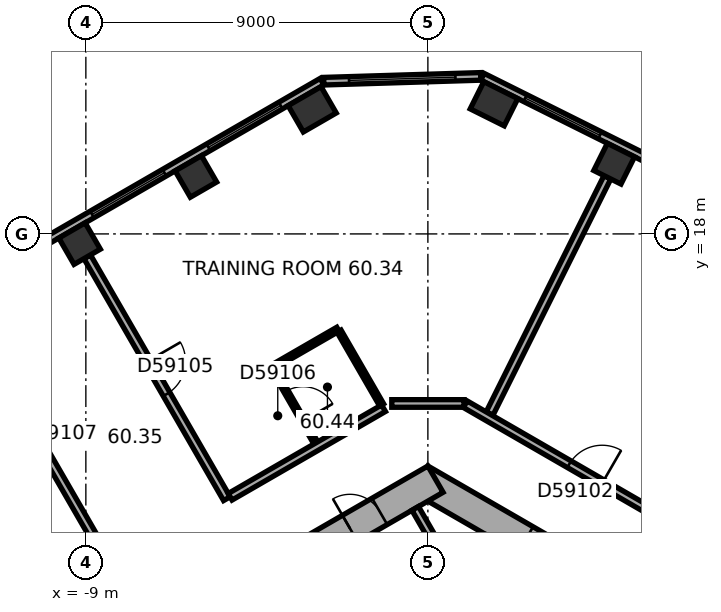
"""IFC4 building model, lengths in metres.
Left out: names, types, materials, properties, quantities, classifications, styles, units other than length and angle.
Written with IfcOpenShell. Run it as: python <this file> out.ifc"""

import sys

from ifc_helpers import new_model, si_unit, direction, frame, frame_2d, origin, origin_2d, place, context, subcontext, project, spatial, rectangle, extrude, element, fill, save


model = new_model("IFC4")
c1 = context("Model", 3, precision=1e-05, world=origin(), true_north=direction((0.0, 1.0)))
c2 = subcontext(c1, "Body", "Model", "MODEL_VIEW")
j1 = project(units=[si_unit("LENGTHUNIT", "METRE"), si_unit("PLANEANGLEUNIT", "RADIAN")], contexts=[c1])
p1 = place(None, origin())
s1 = spatial("IfcSite", under=j1, at=p1, CompositionType="ELEMENT")
p2 = place(p1, origin())
s2 = spatial("IfcBuilding", under=s1, at=p2, CompositionType="ELEMENT")
p3 = place(p2, frame((0.0, 0.0, 243.9)))
s3 = spatial("IfcBuildingStorey", under=s2, at=p3, CompositionType="ELEMENT", Elevation=243.9)
p4 = place(p3, frame((4.902, 19.848, 0.0), z_axis=(0.0, 0.0, 1.0), x_axis=(-0.894934361602, 0.44619781311, 0.0)))
e1 = element("IfcColumn", 1, at=p4, inside=s3, PredefinedType="COLUMN", context=c2, shape_type="SweptSolid", body=[
    extrude(rectangle(XDim=0.8, YDim=0.8, at=origin_2d()), origin(), (0.0, 0.0, 1.0), 3.7),
])
for number, where, z_axis, x_axis in (
    (2, (1.74, 21.425, 0.0), (0.0, 0.0, 1.0), (-0.895, 0.446, 0.0)),
    (3, (-3.044, 21.279, 0.0), (0.0, 0.0, 1.0), (-0.866, -0.5, 0.0)),
):
    element("IfcColumn", number, at=place(p3, frame(where, z_axis=z_axis, x_axis=x_axis)), inside=s3, PredefinedType="COLUMN", context=c2, shape_type="SweptSolid", body=[
        extrude(rectangle(XDim=1.0, YDim=0.8, at=origin_2d()), origin(), (0.0, 0.0, 1.0), 3.7),
    ])
for number, where, z_axis, x_axis in (
    (4, (-6.104, 19.512, 0.0), (0.0, 0.0, 1.0), (-0.866, -0.5, 0.0)),
    (5, (-9.165, 17.745, 0.0), (0.0, 0.0, 1.0), (-0.866, -0.5, 0.0)),
):
    element("IfcColumn", number, at=place(p3, frame(where, z_axis=z_axis, x_axis=x_axis)), inside=s3, PredefinedType="COLUMN", context=c2, shape_type="SweptSolid", body=[
        extrude(rectangle(XDim=0.8, YDim=0.8, at=origin_2d()), origin(), (0.0, 0.0, 1.0), 3.7),
    ])
p5 = place(p3, frame((10.1, 5.6, 0.0), z_axis=(0.0, 0.0, 1.0), x_axis=(-0.866023897231, 0.500002609418, 0.0)))
e6 = element("IfcWall", 6, at=p5, inside=s3, PredefinedType="SHEAR", context=c2, shape_type="SweptSolid", body=[
    extrude(rectangle(XDim=11.894, YDim=0.8, at=frame_2d((5.947, 0.0))), origin(), (0.0, 0.0, 1.0), 3.7),
])
p6 = place(p5, frame((3.897, 0.0, 0.0)))
e7 = element("IfcOpeningElement", 7, at=p6, cuts=e6, PredefinedType="OPENING", context=c2, shape_type="SweptSolid", body=[
    extrude(rectangle(XDim=0.9, YDim=2.1, at=frame_2d((0.45, 1.05))), frame((0.0, 0.41, 0.0), z_axis=(0.0, -1.0, 0.0), x_axis=(1.0, 0.0, 0.0)), (0.0, 0.0, 1.0), 0.82),
])
p7 = place(p5, frame((7.797, 0.0, 0.0)))
e8 = element("IfcOpeningElement", 8, at=p7, cuts=e6, PredefinedType="OPENING", context=c2, shape_type="SweptSolid", body=[
    extrude(rectangle(XDim=0.9, YDim=2.1, at=frame_2d((0.45, 1.05))), frame((0.0, 0.41, 0.0), z_axis=(0.0, -1.0, 0.0), x_axis=(1.0, 0.0, 0.0)), (0.0, 0.0, 1.0), 0.82),
])
p8 = place(p3, frame((0.2, 11.547, 0.0), z_axis=(0.0, 0.0, 1.0), x_axis=(-0.866023897231, -0.500002609418, 0.0)))
e9 = element("IfcWall", 9, at=p8, inside=s3, PredefinedType="SHEAR", context=c2, shape_type="SweptSolid", body=[
    extrude(rectangle(XDim=11.894, YDim=0.8, at=frame_2d((5.947, 0.0))), origin(), (0.0, 0.0, 1.0), 3.7),
])
p9 = place(p8, frame((6.147, 0.0, 0.0)))
e10 = element("IfcOpeningElement", 10, at=p9, cuts=e9, PredefinedType="OPENING", context=c2, shape_type="SweptSolid", body=[
    extrude(rectangle(XDim=1.5, YDim=2.1, at=frame_2d((0.75, 1.05))), frame((0.0, 0.41, 0.0), z_axis=(0.0, -1.0, 0.0), x_axis=(1.0, 0.0, 0.0)), (0.0, 0.0, 1.0), 0.82),
])
p10 = place(p8, frame((1.697, 0.0, 0.0)))
e11 = element("IfcOpeningElement", 11, at=p10, cuts=e9, PredefinedType="OPENING", context=c2, shape_type="SweptSolid", body=[
    extrude(rectangle(XDim=0.9, YDim=2.1, at=frame_2d((0.45, 1.05))), frame((0.0, 0.41, 0.0), z_axis=(0.0, -1.0, 0.0), x_axis=(1.0, 0.0, 0.0)), (0.0, 0.0, 1.0), 0.82),
])
p11 = place(p8, frame((4.297, 0.0, 0.0)))
e12 = element("IfcOpeningElement", 12, at=p11, cuts=e9, PredefinedType="OPENING", context=c2, shape_type="SweptSolid", body=[
    extrude(rectangle(XDim=0.9, YDim=2.1, at=frame_2d((0.45, 1.05))), frame((0.0, 0.41, 0.0), z_axis=(0.0, -1.0, 0.0), x_axis=(1.0, 0.0, 0.0)), (0.0, 0.0, 1.0), 0.82),
])
p12 = place(p3, frame((18.299, 13.727, 0.0), z_axis=(0.0, 0.0, 1.0), x_axis=(-0.894934554817, 0.44619742558, 0.0)))
e13 = element("IfcWall", 13, at=p12, inside=s3, PredefinedType="STANDARD", context=c2, shape_type="SweptSolid", body=[
    extrude(rectangle(XDim=18.841, YDim=0.2, at=frame_2d((9.421, 0.0))), origin(), (0.0, 0.0, 1.0), 3.7),
])
p13 = place(p12, frame((1.253, 0.0, 0.9)))
e14 = element("IfcOpeningElement", 14, at=p13, cuts=e13, PredefinedType="OPENING", context=c2, shape_type="SweptSolid", body=[
    extrude(rectangle(XDim=2.2, YDim=2.0, at=frame_2d((1.1, 1.0))), frame((0.0, 0.11, 0.0), z_axis=(0.0, -1.0, 0.0), x_axis=(1.0, 0.0, 0.0)), (0.0, 0.0, 1.0), 0.22),
])
p14 = place(p12, frame((4.786, 0.0, 0.9)))
e15 = element("IfcOpeningElement", 15, at=p14, cuts=e13, PredefinedType="OPENING", context=c2, shape_type="SweptSolid", body=[
    extrude(rectangle(XDim=2.2, YDim=2.0, at=frame_2d((1.1, 1.0))), frame((0.0, 0.11, 0.0), z_axis=(0.0, -1.0, 0.0), x_axis=(1.0, 0.0, 0.0)), (0.0, 0.0, 1.0), 0.22),
])
p15 = place(p12, frame((8.32, 0.0, 0.9)))
e16 = element("IfcOpeningElement", 16, at=p15, cuts=e13, PredefinedType="OPENING", context=c2, shape_type="SweptSolid", body=[
    extrude(rectangle(XDim=2.2, YDim=2.0, at=frame_2d((1.1, 1.0))), frame((0.0, 0.11, 0.0), z_axis=(0.0, -1.0, 0.0), x_axis=(1.0, 0.0, 0.0)), (0.0, 0.0, 1.0), 0.22),
])
p16 = place(p12, frame((11.854, 0.0, 0.9)))
e17 = element("IfcOpeningElement", 17, at=p16, cuts=e13, PredefinedType="OPENING", context=c2, shape_type="SweptSolid", body=[
    extrude(rectangle(XDim=2.2, YDim=2.0, at=frame_2d((1.1, 1.0))), frame((0.0, 0.11, 0.0), z_axis=(0.0, -1.0, 0.0), x_axis=(1.0, 0.0, 0.0)), (0.0, 0.0, 1.0), 0.22),
])
p17 = place(p12, frame((15.387, 0.0, 0.9)))
e18 = element("IfcOpeningElement", 18, at=p17, cuts=e13, PredefinedType="OPENING", context=c2, shape_type="SweptSolid", body=[
    extrude(rectangle(XDim=2.2, YDim=2.0, at=frame_2d((1.1, 1.0))), frame((0.0, 0.11, 0.0), z_axis=(0.0, -1.0, 0.0), x_axis=(1.0, 0.0, 0.0)), (0.0, 0.0, 1.0), 0.22),
])
p18 = place(p3, frame((1.389, 22.145, 0.0), z_axis=(0.0, 0.0, 1.0), x_axis=(-0.999534702881, -0.030502093955, 0.0)))
e19 = element("IfcWall", 19, at=p18, inside=s3, PredefinedType="STANDARD", context=c2, shape_type="SweptSolid", body=[
    extrude(rectangle(XDim=4.13, YDim=0.2, at=frame_2d((2.065, 0.0))), origin(), (0.0, 0.0, 1.0), 3.7),
])
p19 = place(p18, frame((0.665, 0.0, 0.9)))
e20 = element("IfcOpeningElement", 20, at=p19, cuts=e19, PredefinedType="OPENING", context=c2, shape_type="SweptSolid", body=[
    extrude(rectangle(XDim=2.8, YDim=2.0, at=frame_2d((1.4, 1.0))), frame((0.0, 0.11, 0.0), z_axis=(0.0, -1.0, 0.0), x_axis=(1.0, 0.0, 0.0)), (0.0, 0.0, 1.0), 0.22),
])
p20 = place(p3, frame((-2.786, 22.005, 0.0), z_axis=(0.0, 0.0, 1.0), x_axis=(-0.866026555358, -0.49999800541, 0.0)))
e21 = element("IfcWall", 21, at=p20, inside=s3, PredefinedType="STANDARD", context=c2, shape_type="SweptSolid", body=[
    extrude(rectangle(XDim=18.841, YDim=0.2, at=frame_2d((9.421, 0.0))), origin(), (0.0, 0.0, 1.0), 3.7),
])
p21 = place(p20, frame((1.254, 0.0, 0.9)))
e22 = element("IfcOpeningElement", 22, at=p21, cuts=e21, PredefinedType="OPENING", context=c2, shape_type="SweptSolid", body=[
    extrude(rectangle(XDim=2.2, YDim=2.0, at=frame_2d((1.1, 1.0))), frame((0.0, 0.11, 0.0), z_axis=(0.0, -1.0, 0.0), x_axis=(1.0, 0.0, 0.0)), (0.0, 0.0, 1.0), 0.22),
])
p22 = place(p20, frame((4.788, 0.0, 0.9)))
e23 = element("IfcOpeningElement", 23, at=p22, cuts=e21, PredefinedType="OPENING", context=c2, shape_type="SweptSolid", body=[
    extrude(rectangle(XDim=2.2, YDim=2.0, at=frame_2d((1.1, 1.0))), frame((0.0, 0.11, 0.0), z_axis=(0.0, -1.0, 0.0), x_axis=(1.0, 0.0, 0.0)), (0.0, 0.0, 1.0), 0.22),
])
p23 = place(p20, frame((8.321, 0.0, 0.9)))
e24 = element("IfcOpeningElement", 24, at=p23, cuts=e21, PredefinedType="OPENING", context=c2, shape_type="SweptSolid", body=[
    extrude(rectangle(XDim=2.2, YDim=2.0, at=frame_2d((1.1, 1.0))), frame((0.0, 0.11, 0.0), z_axis=(0.0, -1.0, 0.0), x_axis=(1.0, 0.0, 0.0)), (0.0, 0.0, 1.0), 0.22),
])
p24 = place(p20, frame((11.855, 0.0, 0.9)))
e25 = element("IfcOpeningElement", 25, at=p24, cuts=e21, PredefinedType="OPENING", context=c2, shape_type="SweptSolid", body=[
    extrude(rectangle(XDim=2.2, YDim=2.0, at=frame_2d((1.1, 1.0))), frame((0.0, 0.11, 0.0), z_axis=(0.0, -1.0, 0.0), x_axis=(1.0, 0.0, 0.0)), (0.0, 0.0, 1.0), 0.22),
])
p25 = place(p20, frame((15.389, 0.0, 0.9)))
e26 = element("IfcOpeningElement", 26, at=p25, cuts=e21, PredefinedType="OPENING", context=c2, shape_type="SweptSolid", body=[
    extrude(rectangle(XDim=2.2, YDim=2.0, at=frame_2d((1.1, 1.0))), frame((0.0, 0.11, 0.0), z_axis=(0.0, -1.0, 0.0), x_axis=(1.0, 0.0, 0.0)), (0.0, 0.0, 1.0), 0.22),
])
p26 = place(p3, frame((0.767, 8.872, 0.0), z_axis=(0.0, 0.0, 1.0), x_axis=(-0.499994660107, 0.866028486751, 0.0)))
e27 = element("IfcWall", 27, at=p26, inside=s3, PredefinedType="PARTITIONING", context=c2, shape_type="SweptSolid", body=[
    extrude(rectangle(XDim=2.2, YDim=0.2, at=frame_2d((1.1, 0.0))), origin(), (0.0, 0.0, 1.0), 3.42),
])
p27 = place(p3, frame((-12.025, 15.632, 0.0), z_axis=(0.0, 0.0, 1.0), x_axis=(0.499983153418, -0.866035129944, 0.0)))
e28 = element("IfcWall", 28, at=p27, inside=s3, PredefinedType="PARTITIONING", context=c2, shape_type="SweptSolid", body=[
    extrude(rectangle(XDim=7.35, YDim=0.2, at=frame_2d((3.675, 0.0))), origin(), (0.0, 0.0, 1.0), 3.42),
])
p28 = place(p27, frame((3.175, 0.0, 0.0)))
e29 = element("IfcOpeningElement", 29, at=p28, cuts=e28, PredefinedType="OPENING", context=c2, shape_type="SweptSolid", body=[
    extrude(rectangle(XDim=1.0, YDim=2.1, at=frame_2d((0.5, 1.05))), frame((0.0, 0.11, 0.0), z_axis=(0.0, -1.0, 0.0), x_axis=(1.0, 0.0, 0.0)), (0.0, 0.0, 1.0), 0.22),
])
p29 = place(p3, frame((-8.965, 17.399, 0.0), z_axis=(0.0, 0.0, 1.0), x_axis=(0.499993683172, -0.866029050776, 0.0)))
e30 = element("IfcWall", 30, at=p29, inside=s3, PredefinedType="PARTITIONING", context=c2, shape_type="SweptSolid", body=[
    extrude(rectangle(XDim=7.35, YDim=0.2, at=frame_2d((3.675, 0.0))), origin(), (0.0, 0.0, 1.0), 2.87),
])
p30 = place(p29, frame((3.175, 0.0, 0.0)))
e31 = element("IfcOpeningElement", 31, at=p30, cuts=e30, PredefinedType="OPENING", context=c2, shape_type="SweptSolid", body=[
    extrude(rectangle(XDim=1.0, YDim=2.1, at=frame_2d((0.5, 1.05))), frame((0.0, 0.11, 0.0), z_axis=(0.0, -1.0, 0.0), x_axis=(1.0, 0.0, 0.0)), (0.0, 0.0, 1.0), 0.22),
])
p31 = place(p3, frame((-4.099, 14.492, 0.0), z_axis=(0.0, 0.0, 1.0), x_axis=(0.866041268327, 0.499972520799, 0.0)))
e32 = element("IfcWall", 32, at=p31, inside=s3, PredefinedType="PARTITIONING", context=c2, shape_type="SweptSolid", body=[
    extrude(rectangle(XDim=2.0, YDim=0.12, at=frame_2d((1.0, 0.0))), origin(), (0.0, 0.0, 1.0), 3.42),
])
p32 = place(p3, frame((-2.948, 12.5, 0.0), z_axis=(0.0, 0.0, 1.0), x_axis=(-0.500077830873, 0.865980463445, 0.0)))
e33 = element("IfcWall", 33, at=p32, inside=s3, PredefinedType="PARTITIONING", context=c2, shape_type="SweptSolid", body=[
    extrude(rectangle(XDim=2.24, YDim=0.12, at=frame_2d((1.12, 0.0))), origin(), (0.0, 0.0, 1.0), 3.42),
])
p33 = place(p32, frame((0.67, 0.0, 0.0)))
e34 = element("IfcOpeningElement", 34, at=p33, cuts=e33, PredefinedType="OPENING", context=c2, shape_type="SweptSolid", body=[
    extrude(rectangle(XDim=0.9, YDim=2.1, at=frame_2d((0.45, 1.05))), frame((0.0, 0.07, 0.0), z_axis=(0.0, -1.0, 0.0), x_axis=(1.0, 0.0, 0.0)), (0.0, 0.0, 1.0), 0.14),
])
p34 = place(p3, frame((-2.336, 15.44, 0.0), z_axis=(0.0, 0.0, 1.0), x_axis=(0.49999608499, -0.866027664105, 0.0)))
e35 = element("IfcWall", 35, at=p34, inside=s3, PredefinedType="PARTITIONING", context=c2, shape_type="SweptSolid", body=[
    extrude(rectangle(XDim=2.24, YDim=0.12, at=frame_2d((1.12, 0.0))), origin(), (0.0, 0.0, 1.0), 3.42),
])
p35 = place(p3, frame((-1.167, 13.414, 0.0), z_axis=(0.0, 0.0, 1.0), x_axis=(-0.866023347809, -0.500003561037, 0.0)))
e36 = element("IfcWall", 36, at=p35, inside=s3, PredefinedType="PARTITIONING", context=c2, shape_type="SweptSolid", body=[
    extrude(rectangle(XDim=4.661, YDim=0.2, at=frame_2d((2.331, 0.0))), origin(), (0.0, 0.0, 1.0), 3.42),
])
p36 = place(p3, frame((0.95, 13.539, 0.0), z_axis=(0.0, 0.0, 1.0), x_axis=(-1.0, 0.0, 0.0)))
e37 = element("IfcWall", 37, at=p36, inside=s3, PredefinedType="PARTITIONING", context=c2, shape_type="SweptSolid", body=[
    extrude(rectangle(XDim=1.9, YDim=0.2, at=frame_2d((0.95, 0.0))), origin(), (0.0, 0.0, 1.0), 3.42),
])
p37 = place(p3, frame((4.723, 19.49, 0.0), z_axis=(0.0, 0.0, 1.0), x_axis=(-0.446186614574, -0.894939944898, 0.0)))
e38 = element("IfcWall", 38, at=p37, inside=s3, PredefinedType="PARTITIONING", context=c2, shape_type="SweptSolid", body=[
    extrude(rectangle(XDim=6.944, YDim=0.2, at=frame_2d((3.472, 0.0))), origin(), (0.0, 0.0, 1.0), 2.87),
])
p38 = place(p3, frame((9.198, 8.777, 0.0), z_axis=(0.0, 0.0, 1.0), x_axis=(-0.866026106692, 0.499998782526, 0.0)))
e39 = element("IfcWall", 39, at=p38, inside=s3, PredefinedType="PARTITIONING", context=c2, shape_type="SweptSolid", body=[
    extrude(rectangle(XDim=9.483, YDim=0.2, at=frame_2d((4.742, 0.0))), origin(), (0.0, 0.0, 1.0), 3.42),
])
p39 = place(p38, frame((5.325, 0.0, 0.0)))
e40 = element("IfcOpeningElement", 40, at=p39, cuts=e39, PredefinedType="OPENING", context=c2, shape_type="SweptSolid", body=[
    extrude(rectangle(XDim=1.0, YDim=2.1, at=frame_2d((0.5, 1.05))), frame((0.0, 0.11, 0.0), z_axis=(0.0, -1.0, 0.0), x_axis=(1.0, 0.0, 0.0)), (0.0, 0.0, 1.0), 0.22),
])
p40 = place(p17, origin())
e41 = element("IfcWindow", 41, at=p40, inside=s3, PartitioningType="SINGLE_PANEL", PredefinedType="WINDOW", context=c2, shape_type="SweptSolid", body=[
    extrude(rectangle(XDim=2.2, YDim=2.0, at=frame_2d((1.1, 1.0))), frame((0.0, 0.03, 0.0), z_axis=(0.0, -1.0, 0.0), x_axis=(1.0, 0.0, 0.0)), (0.0, 0.0, 1.0), 0.06),
])
fill(e18, e41)
p41 = place(p19, origin())
e42 = element("IfcWindow", 42, at=p41, inside=s3, PartitioningType="SINGLE_PANEL", PredefinedType="WINDOW", context=c2, shape_type="SweptSolid", body=[
    extrude(rectangle(XDim=2.8, YDim=2.0, at=frame_2d((1.4, 1.0))), frame((0.0, 0.03, 0.0), z_axis=(0.0, -1.0, 0.0), x_axis=(1.0, 0.0, 0.0)), (0.0, 0.0, 1.0), 0.06),
])
fill(e20, e42)
p42 = place(p21, origin())
e43 = element("IfcWindow", 43, at=p42, inside=s3, PartitioningType="SINGLE_PANEL", PredefinedType="WINDOW", context=c2, shape_type="SweptSolid", body=[
    extrude(rectangle(XDim=2.2, YDim=2.0, at=frame_2d((1.1, 1.0))), frame((0.0, 0.03, 0.0), z_axis=(0.0, -1.0, 0.0), x_axis=(1.0, 0.0, 0.0)), (0.0, 0.0, 1.0), 0.06),
])
fill(e22, e43)
p43 = place(p22, origin())
e44 = element("IfcWindow", 44, at=p43, inside=s3, PartitioningType="SINGLE_PANEL", PredefinedType="WINDOW", context=c2, shape_type="SweptSolid", body=[
    extrude(rectangle(XDim=2.2, YDim=2.0, at=frame_2d((1.1, 1.0))), frame((0.0, 0.03, 0.0), z_axis=(0.0, -1.0, 0.0), x_axis=(1.0, 0.0, 0.0)), (0.0, 0.0, 1.0), 0.06),
])
fill(e23, e44)
p44 = place(p10, origin())
e45 = element("IfcDoor", 45, at=p44, inside=s3, OperationType="SINGLE_SWING_LEFT", PredefinedType="DOOR", context=c2, shape_type="SweptSolid", body=[
    extrude(rectangle(XDim=0.9, YDim=2.1, at=frame_2d((0.45, 1.05))), frame((0.0, 0.025, 0.0), z_axis=(0.0, -1.0, 0.0), x_axis=(1.0, 0.0, 0.0)), (0.0, 0.0, 1.0), 0.05),
])
fill(e11, e45)
p45 = place(p39, origin())
e46 = element("IfcDoor", 46, at=p45, inside=s3, OperationType="SINGLE_SWING_LEFT", PredefinedType="DOOR", context=c2, shape_type="SweptSolid", body=[
    extrude(rectangle(XDim=1.0, YDim=2.1, at=frame_2d((0.5, 1.05))), frame((0.0, 0.025, 0.0), z_axis=(0.0, -1.0, 0.0), x_axis=(1.0, 0.0, 0.0)), (0.0, 0.0, 1.0), 0.05),
])
fill(e40, e46)
p46 = place(p30, origin())
e47 = element("IfcDoor", 47, at=p46, inside=s3, OperationType="SINGLE_SWING_LEFT", PredefinedType="DOOR", context=c2, shape_type="SweptSolid", body=[
    extrude(rectangle(XDim=1.0, YDim=2.1, at=frame_2d((0.5, 1.05))), frame((0.0, 0.025, 0.0), z_axis=(0.0, -1.0, 0.0), x_axis=(1.0, 0.0, 0.0)), (0.0, 0.0, 1.0), 0.05),
])
fill(e31, e47)
p47 = place(p33, origin())
e48 = element("IfcDoor", 48, at=p47, inside=s3, OperationType="SINGLE_SWING_LEFT", PredefinedType="DOOR", context=c2, shape_type="SweptSolid", body=[
    extrude(rectangle(XDim=0.9, YDim=2.1, at=frame_2d((0.45, 1.05))), frame((0.0, 0.025, 0.0), z_axis=(0.0, -1.0, 0.0), x_axis=(1.0, 0.0, 0.0)), (0.0, 0.0, 1.0), 0.05),
])
fill(e34, e48)
save(model, sys.argv[1])
